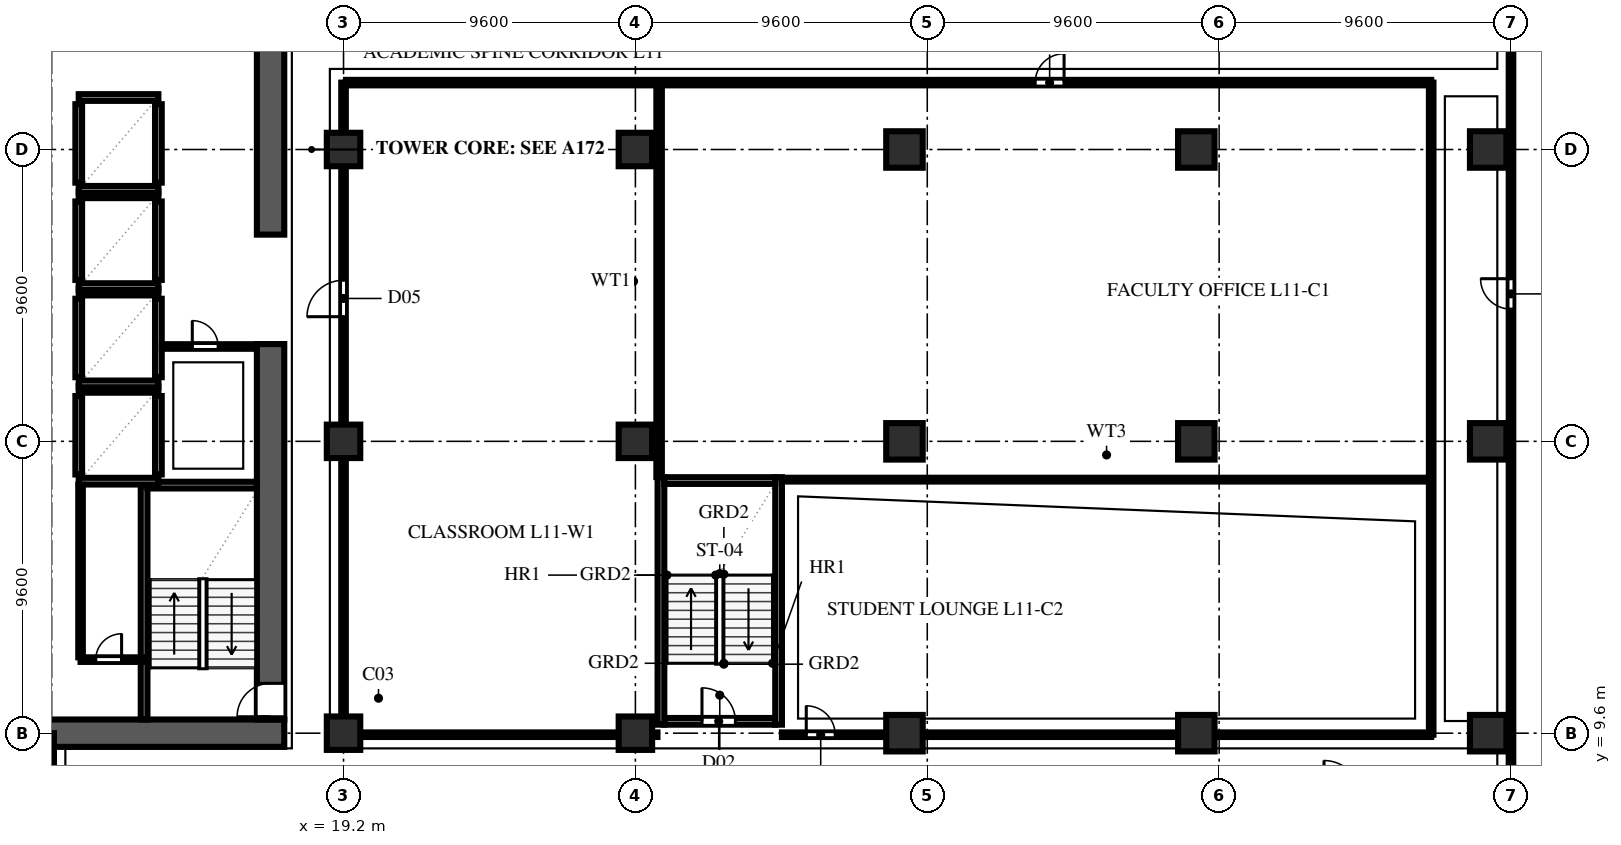
"""IFC4 building model, lengths in metres.
Left out: names, types, materials, properties, quantities, classifications, styles, units other than length and angle.
Written with IfcOpenShell. Run it as: python <this file> out.ifc"""

import sys

from ifc_helpers import new_model, si_unit, direction, frame, frame_2d, origin, origin_2d, place, context, subcontext, project, spatial, rectangle, extrude, element, fill, save


model = new_model("IFC4")
c1 = context("Model", 3, precision=1e-05, world=origin(), true_north=direction((0.0, 1.0)))
c2 = subcontext(c1, "Body", "Model", "MODEL_VIEW")
j1 = project(units=[si_unit("LENGTHUNIT", "METRE"), si_unit("PLANEANGLEUNIT", "RADIAN")], contexts=[c1])
p1 = place(None, origin())
s1 = spatial("IfcSite", under=j1, at=p1, CompositionType="ELEMENT")
p2 = place(p1, origin())
s2 = spatial("IfcBuilding", under=s1, at=p2, CompositionType="ELEMENT")
p3 = place(p2, frame((0.0, 0.0, 47.0)))
s3 = spatial("IfcBuildingStorey", under=s2, at=p3, CompositionType="ELEMENT", Elevation=47.0)
p4 = place(p3, frame((2.65, 9.6, 0.0), z_axis=(0.0, 0.0, 1.0), x_axis=(1.0, 0.0, 0.0)))
e1 = element("IfcWall", 1, at=p4, inside=s3, PredefinedType="SHEAR", context=c2, shape_type="SweptSolid", body=[
    extrude(rectangle(XDim=14.6, YDim=0.9, at=frame_2d((7.3, 0.0))), origin(), (0.0, 0.0, 1.0), 3.54),
])
p5 = place(p3, frame((16.8, 10.05, 0.0), z_axis=(0.0, 0.0, 1.0), x_axis=(0.0, 1.0, 0.0)))
e2 = element("IfcWall", 2, at=p5, inside=s3, PredefinedType="SHEAR", context=c2, shape_type="SweptSolid", body=[
    extrude(rectangle(XDim=12.35, YDim=0.9, at=frame_2d((6.175, 0.0))), origin(), (0.0, 0.0, 1.0), 3.54),
])
p6 = place(p5, frame((0.09, 0.0, 0.0)))
e3 = element("IfcOpeningElement", 3, at=p6, cuts=e2, PredefinedType="OPENING", context=c2, shape_type="SweptSolid", body=[
    extrude(rectangle(XDim=1.1, YDim=2.2, at=frame_2d((0.55, 1.1))), frame((0.0, 0.462, 0.0), z_axis=(0.0, -1.0, 0.0), x_axis=(1.0, 0.0, 0.0)), (0.0, 0.0, 1.0), 0.924),
])
p7 = place(p3, frame((16.8, 26.0, 0.0), z_axis=(0.0, 0.0, 1.0), x_axis=(0.0, 1.0, 0.0)))
e4 = element("IfcWall", 4, at=p7, inside=s3, PredefinedType="SHEAR", context=c2, shape_type="SweptSolid", body=[
    extrude(rectangle(XDim=7.8, YDim=0.9, at=frame_2d((3.9, 0.0))), origin(), (0.0, 0.0, 1.0), 3.54),
])
for number, where, z_axis, x_axis in (
    (5, (19.2, 9.6, 0.0), (0.0, 0.0, 1.0), (1.0, 0.0, 0.0)),
    (6, (19.2, 19.2, 0.0), (0.0, 0.0, 1.0), (1.0, 0.0, 0.0)),
    (7, (19.2, 28.8, 0.0), (0.0, 0.0, 1.0), (1.0, 0.0, 0.0)),
    (8, (28.8, 9.6, 0.0), (0.0, 0.0, 1.0), (1.0, 0.0, 0.0)),
    (9, (28.8, 19.2, 0.0), (0.0, 0.0, 1.0), (1.0, 0.0, 0.0)),
    (10, (28.8, 28.8, 0.0), (0.0, 0.0, 1.0), (1.0, 0.0, 0.0)),
):
    element("IfcColumn", number, at=place(p3, frame(where, z_axis=z_axis, x_axis=x_axis)), inside=s3, PredefinedType="COLUMN", context=c2, shape_type="SweptSolid", body=[
        extrude(rectangle(XDim=1.1, YDim=1.1, at=origin_2d()), origin(), (0.0, 0.0, 1.0), 3.8),
    ])
for number, where, z_axis, x_axis in (
    (11, (37.65, 9.6, 0.0), (0.0, 0.0, 1.0), (1.0, 0.0, 0.0)),
    (12, (37.65, 19.2, 0.0), (0.0, 0.0, 1.0), (1.0, 0.0, 0.0)),
    (13, (37.65, 28.8, 0.0), (0.0, 0.0, 1.0), (1.0, 0.0, 0.0)),
    (14, (47.25, 9.6, 0.0), (0.0, 0.0, 1.0), (1.0, 0.0, 0.0)),
    (15, (47.25, 19.2, 0.0), (0.0, 0.0, 1.0), (1.0, 0.0, 0.0)),
    (16, (47.25, 28.8, 0.0), (0.0, 0.0, 1.0), (1.0, 0.0, 0.0)),
    (17, (56.85, 9.6, 0.0), (0.0, 0.0, 1.0), (1.0, 0.0, 0.0)),
    (18, (56.85, 19.2, 0.0), (0.0, 0.0, 1.0), (1.0, 0.0, 0.0)),
    (19, (56.85, 28.8, 0.0), (0.0, 0.0, 1.0), (1.0, 0.0, 0.0)),
):
    element("IfcColumn", number, at=place(p3, frame(where, z_axis=z_axis, x_axis=x_axis)), inside=s3, PredefinedType="COLUMN", context=c2, shape_type="SweptSolid", body=[
        extrude(rectangle(XDim=1.2, YDim=1.2, at=origin_2d()), origin(), (0.0, 0.0, 1.0), 3.8),
    ])
p8 = place(p3, frame((12.64, 10.05, 0.0), z_axis=(0.0, 0.0, 1.0), x_axis=(0.0, 1.0, 0.0)))
e20 = element("IfcWall", 20, at=p8, inside=s3, PredefinedType="SOLIDWALL", context=c2, shape_type="SweptSolid", body=[
    extrude(rectangle(XDim=7.71, YDim=0.22, at=frame_2d((3.855, 0.0))), origin(), (0.0, 0.0, 1.0), 3.54),
])
p9 = place(p3, frame((12.75, 17.76, 0.0), z_axis=(0.0, 0.0, 1.0), x_axis=(1.0, 0.0, 0.0)))
e21 = element("IfcWall", 21, at=p9, inside=s3, PredefinedType="SOLIDWALL", context=c2, shape_type="SweptSolid", body=[
    extrude(rectangle(XDim=3.6, YDim=0.22, at=frame_2d((1.8, 0.0))), origin(), (0.0, 0.0, 1.0), 3.54),
])
p10 = place(p3, frame((29.75, 9.99, 0.0), z_axis=(0.0, 0.0, 1.0), x_axis=(1.0, 0.0, 0.0)))
e22 = element("IfcWall", 22, at=p10, inside=s3, PredefinedType="SOLIDWALL", context=c2, shape_type="SweptSolid", body=[
    extrude(rectangle(XDim=3.65, YDim=0.22, at=frame_2d((1.825, 0.0))), origin(), (0.0, 0.0, 1.0), 3.54),
])
p11 = place(p10, frame((1.24, 0.0, 0.0)))
e23 = element("IfcOpeningElement", 23, at=p11, cuts=e22, PredefinedType="OPENING", context=c2, shape_type="SweptSolid", body=[
    extrude(rectangle(XDim=1.1, YDim=2.2, at=frame_2d((0.55, 1.1))), frame((0.0, 0.122, 0.0), z_axis=(0.0, -1.0, 0.0), x_axis=(1.0, 0.0, 0.0)), (0.0, 0.0, 1.0), 0.244),
])
for number, where, z_axis, x_axis in (
    (24, (29.64, 9.88, 0.0), (0.0, 0.0, 1.0), (0.0, 1.0, 0.0)),
    (25, (33.51, 9.88, 0.0), (0.0, 0.0, 1.0), (0.0, 1.0, 0.0)),
):
    element("IfcWall", number, at=place(p3, frame(where, z_axis=z_axis, x_axis=x_axis)), inside=s3, PredefinedType="SOLIDWALL", context=c2, shape_type="SweptSolid", body=[
        extrude(rectangle(XDim=8.14, YDim=0.22, at=frame_2d((4.07, 0.0))), origin(), (0.0, 0.0, 1.0), 3.54),
    ])
p12 = place(p3, frame((29.75, 17.91, 0.0), z_axis=(0.0, 0.0, 1.0), x_axis=(1.0, 0.0, 0.0)))
e26 = element("IfcWall", 26, at=p12, inside=s3, PredefinedType="SOLIDWALL", context=c2, shape_type="SweptSolid", body=[
    extrude(rectangle(XDim=3.65, YDim=0.22, at=frame_2d((1.825, 0.0))), origin(), (0.0, 0.0, 1.0), 3.54),
])
for number, where, z_axis, x_axis in (
    (27, (10.49, 18.11, 0.0), (0.0, 0.0, 1.0), (0.0, 1.0, 0.0)),
    (28, (13.11, 18.11, 0.0), (0.0, 0.0, 1.0), (0.0, 1.0, 0.0)),
):
    element("IfcWall", number, at=place(p3, frame(where, z_axis=z_axis, x_axis=x_axis)), inside=s3, PredefinedType="SOLIDWALL", context=c2, shape_type="SweptSolid", body=[
        extrude(rectangle(XDim=2.58, YDim=0.22, at=frame_2d((1.29, 0.0))), origin(), (0.0, 0.0, 1.0), 3.54),
    ])
for number, where, z_axis, x_axis in (
    (29, (10.49, 17.89, 0.0), (0.0, 0.0, 1.0), (1.0, 0.0, 0.0)),
    (30, (10.49, 20.91, 0.0), (0.0, 0.0, 1.0), (1.0, 0.0, 0.0)),
):
    element("IfcWall", number, at=place(p3, frame(where, z_axis=z_axis, x_axis=x_axis)), inside=s3, PredefinedType="SOLIDWALL", context=c2, shape_type="SweptSolid", body=[
        extrude(rectangle(XDim=2.62, YDim=0.22, at=frame_2d((1.31, 0.0))), origin(), (0.0, 0.0, 1.0), 3.54),
    ])
for number, where, z_axis, x_axis in (
    (31, (10.49, 21.31, 0.0), (0.0, 0.0, 1.0), (0.0, 1.0, 0.0)),
    (32, (13.11, 21.31, 0.0), (0.0, 0.0, 1.0), (0.0, 1.0, 0.0)),
):
    element("IfcWall", number, at=place(p3, frame(where, z_axis=z_axis, x_axis=x_axis)), inside=s3, PredefinedType="SOLIDWALL", context=c2, shape_type="SweptSolid", body=[
        extrude(rectangle(XDim=2.58, YDim=0.22, at=frame_2d((1.29, 0.0))), origin(), (0.0, 0.0, 1.0), 3.54),
    ])
for number, where, z_axis, x_axis in (
    (33, (10.49, 21.09, 0.0), (0.0, 0.0, 1.0), (1.0, 0.0, 0.0)),
    (34, (10.49, 24.11, 0.0), (0.0, 0.0, 1.0), (1.0, 0.0, 0.0)),
):
    element("IfcWall", number, at=place(p3, frame(where, z_axis=z_axis, x_axis=x_axis)), inside=s3, PredefinedType="SOLIDWALL", context=c2, shape_type="SweptSolid", body=[
        extrude(rectangle(XDim=2.62, YDim=0.22, at=frame_2d((1.31, 0.0))), origin(), (0.0, 0.0, 1.0), 3.54),
    ])
for number, where, z_axis, x_axis in (
    (35, (10.49, 24.51, 0.0), (0.0, 0.0, 1.0), (0.0, 1.0, 0.0)),
    (36, (13.11, 24.51, 0.0), (0.0, 0.0, 1.0), (0.0, 1.0, 0.0)),
):
    element("IfcWall", number, at=place(p3, frame(where, z_axis=z_axis, x_axis=x_axis)), inside=s3, PredefinedType="SOLIDWALL", context=c2, shape_type="SweptSolid", body=[
        extrude(rectangle(XDim=2.58, YDim=0.22, at=frame_2d((1.29, 0.0))), origin(), (0.0, 0.0, 1.0), 3.54),
    ])
for number, where, z_axis, x_axis in (
    (37, (10.49, 24.29, 0.0), (0.0, 0.0, 1.0), (1.0, 0.0, 0.0)),
    (38, (10.49, 27.31, 0.0), (0.0, 0.0, 1.0), (1.0, 0.0, 0.0)),
):
    element("IfcWall", number, at=place(p3, frame(where, z_axis=z_axis, x_axis=x_axis)), inside=s3, PredefinedType="SOLIDWALL", context=c2, shape_type="SweptSolid", body=[
        extrude(rectangle(XDim=2.62, YDim=0.22, at=frame_2d((1.31, 0.0))), origin(), (0.0, 0.0, 1.0), 3.54),
    ])
for number, where, z_axis, x_axis in (
    (39, (10.49, 27.71, 0.0), (0.0, 0.0, 1.0), (0.0, 1.0, 0.0)),
    (40, (13.11, 27.71, 0.0), (0.0, 0.0, 1.0), (0.0, 1.0, 0.0)),
):
    element("IfcWall", number, at=place(p3, frame(where, z_axis=z_axis, x_axis=x_axis)), inside=s3, PredefinedType="SOLIDWALL", context=c2, shape_type="SweptSolid", body=[
        extrude(rectangle(XDim=2.58, YDim=0.22, at=frame_2d((1.29, 0.0))), origin(), (0.0, 0.0, 1.0), 3.54),
    ])
for number, where, z_axis, x_axis in (
    (41, (10.49, 27.49, 0.0), (0.0, 0.0, 1.0), (1.0, 0.0, 0.0)),
    (42, (10.49, 30.51, 0.0), (0.0, 0.0, 1.0), (1.0, 0.0, 0.0)),
):
    element("IfcWall", number, at=place(p3, frame(where, z_axis=z_axis, x_axis=x_axis)), inside=s3, PredefinedType="SOLIDWALL", context=c2, shape_type="SweptSolid", body=[
        extrude(rectangle(XDim=2.62, YDim=0.22, at=frame_2d((1.31, 0.0))), origin(), (0.0, 0.0, 1.0), 3.54),
    ])
p13 = place(p3, frame((10.55, 12.02, 0.0), z_axis=(0.0, 0.0, 1.0), x_axis=(1.0, 0.0, 0.0)))
e43 = element("IfcWall", 43, at=p13, inside=s3, PredefinedType="PARTITIONING", context=c2, shape_type="SweptSolid", body=[
    extrude(rectangle(XDim=2.08, YDim=0.15, at=frame_2d((1.04, 0.0))), origin(), (0.0, 0.0, 1.0), 3.54),
])
p14 = place(p13, frame((0.5, 0.0, 0.0)))
e44 = element("IfcOpeningElement", 44, at=p14, cuts=e43, PredefinedType="OPENING", context=c2, shape_type="SweptSolid", body=[
    extrude(rectangle(XDim=0.85, YDim=2.1, at=frame_2d((0.425, 1.05))), frame((0.0, 0.087, 0.0), z_axis=(0.0, -1.0, 0.0), x_axis=(1.0, 0.0, 0.0)), (0.0, 0.0, 1.0), 0.174),
])
p15 = place(p3, frame((10.55, 12.095, 0.0), z_axis=(0.0, 0.0, 1.0), x_axis=(0.0, 1.0, 0.0)))
e45 = element("IfcWall", 45, at=p15, inside=s3, PredefinedType="PARTITIONING", context=c2, shape_type="SweptSolid", body=[
    extrude(rectangle(XDim=5.68, YDim=0.15, at=frame_2d((2.84, 0.0))), origin(), (0.0, 0.0, 1.0), 3.54),
])
p16 = place(p3, frame((13.225, 22.32, 0.0), z_axis=(0.0, 0.0, 1.0), x_axis=(1.0, 0.0, 0.0)))
e46 = element("IfcWall", 46, at=p16, inside=s3, PredefinedType="PARTITIONING", context=c2, shape_type="SweptSolid", body=[
    extrude(rectangle(XDim=3.12, YDim=0.15, at=frame_2d((1.56, 0.0))), origin(), (0.0, 0.0, 1.0), 3.54),
])
p17 = place(p16, frame((1.0, 0.0, 0.0)))
e47 = element("IfcOpeningElement", 47, at=p17, cuts=e46, PredefinedType="OPENING", context=c2, shape_type="SweptSolid", body=[
    extrude(rectangle(XDim=0.85, YDim=2.1, at=frame_2d((0.425, 1.05))), frame((0.0, 0.087, 0.0), z_axis=(0.0, -1.0, 0.0), x_axis=(1.0, 0.0, 0.0)), (0.0, 0.0, 1.0), 0.174),
])
p18 = place(p3, frame((9.6, 7.5, 0.0), z_axis=(0.0, 0.0, 1.0), x_axis=(0.0, 1.0, 0.0)))
e48 = element("IfcWall", 48, at=p18, inside=s3, PredefinedType="PARTITIONING", context=c2, shape_type="SweptSolid", body=[
    extrude(rectangle(XDim=2.1, YDim=0.15, at=frame_2d((1.05, 0.0))), origin(), (0.0, 0.0, 1.0), 3.184),
])
p19 = place(p3, frame((57.6, 0.22, 0.0), z_axis=(0.0, 0.0, 1.0), x_axis=(0.0, 1.0, 0.0)))
e49 = element("IfcWall", 49, at=p19, inside=s3, PredefinedType="PARTITIONING", context=c2, shape_type="SweptSolid", body=[
    extrude(rectangle(XDim=37.96, YDim=0.15, at=frame_2d((18.98, 0.0))), origin(), (0.0, 0.0, 1.0), 3.54),
])
p20 = place(p19, frame((23.33, 0.0, 0.0)))
e50 = element("IfcOpeningElement", 50, at=p20, cuts=e49, PredefinedType="OPENING", context=c2, shape_type="SweptSolid", body=[
    extrude(rectangle(XDim=1.0, YDim=2.2, at=frame_2d((0.5, 1.1))), frame((0.0, 0.087, 0.0), z_axis=(0.0, -1.0, 0.0), x_axis=(1.0, 0.0, 0.0)), (0.0, 0.0, 1.0), 0.174),
])
p21 = place(p3, frame((19.2, 9.55, 0.0), z_axis=(0.0, 0.0, 1.0), x_axis=(0.0, 1.0, 0.0)))
e51 = element("IfcWall", 51, at=p21, inside=s3, PredefinedType="PARTITIONING", context=c2, shape_type="SweptSolid", body=[
    extrude(rectangle(XDim=21.45, YDim=0.15, at=frame_2d((10.725, 0.0))), origin(), (0.0, 0.0, 1.0), 3.184),
])
p22 = place(p21, frame((13.75, 0.0, 0.0)))
e52 = element("IfcOpeningElement", 52, at=p22, cuts=e51, PredefinedType="OPENING", context=c2, shape_type="SweptSolid", body=[
    extrude(rectangle(XDim=1.2, YDim=2.2, at=frame_2d((0.6, 1.1))), frame((0.0, 0.087, 0.0), z_axis=(0.0, -1.0, 0.0), x_axis=(1.0, 0.0, 0.0)), (0.0, 0.0, 1.0), 0.174),
])
p23 = place(p3, frame((29.58, 18.025, 0.0), z_axis=(0.0, 0.0, 1.0), x_axis=(0.0, 1.0, 0.0)))
e53 = element("IfcWall", 53, at=p23, inside=s3, PredefinedType="PARTITIONING", context=c2, shape_type="SweptSolid", body=[
    extrude(rectangle(XDim=12.88, YDim=0.18, at=frame_2d((6.44, 0.0))), origin(), (0.0, 0.0, 1.0), 3.54),
])
p24 = place(p3, frame((19.28, 31.0, 0.0), z_axis=(0.0, 0.0, 1.0), x_axis=(1.0, 0.0, 0.0)))
e54 = element("IfcWall", 54, at=p24, inside=s3, PredefinedType="PARTITIONING", context=c2, shape_type="SweptSolid", body=[
    extrude(rectangle(XDim=35.695, YDim=0.18, at=frame_2d((17.848, 0.0))), origin(), (0.0, 0.0, 1.0), 3.54),
])
p25 = place(p24, frame((22.67, 0.0, 0.0)))
e55 = element("IfcOpeningElement", 55, at=p25, cuts=e54, PredefinedType="OPENING", context=c2, shape_type="SweptSolid", body=[
    extrude(rectangle(XDim=0.95, YDim=2.15, at=frame_2d((0.475, 1.075))), frame((0.0, 0.102, 0.0), z_axis=(0.0, -1.0, 0.0), x_axis=(1.0, 0.0, 0.0)), (0.0, 0.0, 1.0), 0.204),
])
p26 = place(p3, frame((19.28, 9.55, 0.0), z_axis=(0.0, 0.0, 1.0), x_axis=(1.0, 0.0, 0.0)))
e56 = element("IfcWall", 56, at=p26, inside=s3, PredefinedType="PARTITIONING", context=c2, shape_type="SweptSolid", body=[
    extrude(rectangle(XDim=10.245, YDim=0.15, at=frame_2d((5.123, 0.0))), origin(), (0.0, 0.0, 1.0), 3.184),
])
p27 = place(p3, frame((33.62, 17.94, 0.0), z_axis=(0.0, 0.0, 1.0), x_axis=(1.0, 0.0, 0.0)))
e57 = element("IfcWall", 57, at=p27, inside=s3, PredefinedType="PARTITIONING", context=c2, shape_type="SweptSolid", body=[
    extrude(rectangle(XDim=21.355, YDim=0.125, at=frame_2d((10.677, 0.0))), origin(), (0.0, 0.0, 1.0), 3.54),
])
p28 = place(p3, frame((33.62, 9.55, 0.0), z_axis=(0.0, 0.0, 1.0), x_axis=(1.0, 0.0, 0.0)))
e58 = element("IfcWall", 58, at=p28, inside=s3, PredefinedType="PARTITIONING", context=c2, shape_type="SweptSolid", body=[
    extrude(rectangle(XDim=21.355, YDim=0.15, at=frame_2d((10.677, 0.0))), origin(), (0.0, 0.0, 1.0), 3.184),
])
p29 = place(p28, frame((0.8, 0.0, 0.0)))
e59 = element("IfcOpeningElement", 59, at=p29, cuts=e58, PredefinedType="OPENING", context=c2, shape_type="SweptSolid", body=[
    extrude(rectangle(XDim=0.95, YDim=2.15, at=frame_2d((0.475, 1.075))), frame((0.0, 0.087, 0.0), z_axis=(0.0, -1.0, 0.0), x_axis=(1.0, 0.0, 0.0)), (0.0, 0.0, 1.0), 0.174),
])
p30 = place(p3, frame((54.975, 9.55, 0.0), z_axis=(0.0, 0.0, 1.0), x_axis=(0.0, 1.0, 0.0)))
e60 = element("IfcWall", 60, at=p30, inside=s3, PredefinedType="PARTITIONING", context=c2, shape_type="SweptSolid", body=[
    extrude(rectangle(XDim=21.45, YDim=0.15, at=frame_2d((10.725, 0.0))), origin(), (0.0, 0.0, 1.0), 3.54),
])
p31 = place(p6, origin())
e61 = element("IfcDoor", 61, at=p31, inside=s3, OperationType="SINGLE_SWING_LEFT", PredefinedType="DOOR", context=c2, shape_type="SweptSolid", body=[
    extrude(rectangle(XDim=1.1, YDim=2.2, at=frame_2d((0.55, 1.1))), frame((0.0, 0.025, 0.0), z_axis=(0.0, -1.0, 0.0), x_axis=(1.0, 0.0, 0.0)), (0.0, 0.0, 1.0), 0.05),
])
fill(e3, e61)
p32 = place(p11, origin())
e62 = element("IfcDoor", 62, at=p32, inside=s3, OperationType="SINGLE_SWING_LEFT", PredefinedType="DOOR", context=c2, shape_type="SweptSolid", body=[
    extrude(rectangle(XDim=1.1, YDim=2.2, at=frame_2d((0.55, 1.1))), frame((0.0, 0.025, 0.0), z_axis=(0.0, -1.0, 0.0), x_axis=(1.0, 0.0, 0.0)), (0.0, 0.0, 1.0), 0.05),
])
fill(e23, e62)
p33 = place(p14, origin())
e63 = element("IfcDoor", 63, at=p33, inside=s3, OperationType="SINGLE_SWING_RIGHT", PredefinedType="DOOR", context=c2, shape_type="SweptSolid", body=[
    extrude(rectangle(XDim=0.85, YDim=2.1, at=frame_2d((0.425, 1.05))), frame((0.0, 0.025, 0.0), z_axis=(0.0, -1.0, 0.0), x_axis=(1.0, 0.0, 0.0)), (0.0, 0.0, 1.0), 0.05),
])
fill(e44, e63)
p34 = place(p17, origin())
e64 = element("IfcDoor", 64, at=p34, inside=s3, OperationType="SINGLE_SWING_LEFT", PredefinedType="DOOR", context=c2, shape_type="SweptSolid", body=[
    extrude(rectangle(XDim=0.85, YDim=2.1, at=frame_2d((0.425, 1.05))), frame((0.0, 0.025, 0.0), z_axis=(0.0, -1.0, 0.0), x_axis=(1.0, 0.0, 0.0)), (0.0, 0.0, 1.0), 0.05),
])
fill(e47, e64)
p35 = place(p20, origin())
e65 = element("IfcDoor", 65, at=p35, inside=s3, OperationType="SINGLE_SWING_RIGHT", PredefinedType="DOOR", context=c2, shape_type="SweptSolid", body=[
    extrude(rectangle(XDim=1.0, YDim=2.2, at=frame_2d((0.5, 1.1))), frame((0.0, 0.025, 0.0), z_axis=(0.0, -1.0, 0.0), x_axis=(1.0, 0.0, 0.0)), (0.0, 0.0, 1.0), 0.05),
])
fill(e50, e65)
p36 = place(p22, origin())
e66 = element("IfcDoor", 66, at=p36, inside=s3, OperationType="SINGLE_SWING_LEFT", PredefinedType="DOOR", context=c2, shape_type="SweptSolid", body=[
    extrude(rectangle(XDim=1.2, YDim=2.2, at=frame_2d((0.6, 1.1))), frame((0.0, 0.025, 0.0), z_axis=(0.0, -1.0, 0.0), x_axis=(1.0, 0.0, 0.0)), (0.0, 0.0, 1.0), 0.05),
])
fill(e52, e66)
p37 = place(p25, origin())
e67 = element("IfcDoor", 67, at=p37, inside=s3, OperationType="SINGLE_SWING_RIGHT", PredefinedType="DOOR", context=c2, shape_type="SweptSolid", body=[
    extrude(rectangle(XDim=0.95, YDim=2.15, at=frame_2d((0.475, 1.075))), frame((0.0, 0.025, 0.0), z_axis=(0.0, -1.0, 0.0), x_axis=(1.0, 0.0, 0.0)), (0.0, 0.0, 1.0), 0.05),
])
fill(e55, e67)
p38 = place(p29, origin())
e68 = element("IfcDoor", 68, at=p38, inside=s3, OperationType="SINGLE_SWING_LEFT", PredefinedType="DOOR", context=c2, shape_type="SweptSolid", body=[
    extrude(rectangle(XDim=0.95, YDim=2.15, at=frame_2d((0.475, 1.075))), frame((0.0, 0.025, 0.0), z_axis=(0.0, -1.0, 0.0), x_axis=(1.0, 0.0, 0.0)), (0.0, 0.0, 1.0), 0.05),
])
fill(e59, e68)
save(model, sys.argv[1])
